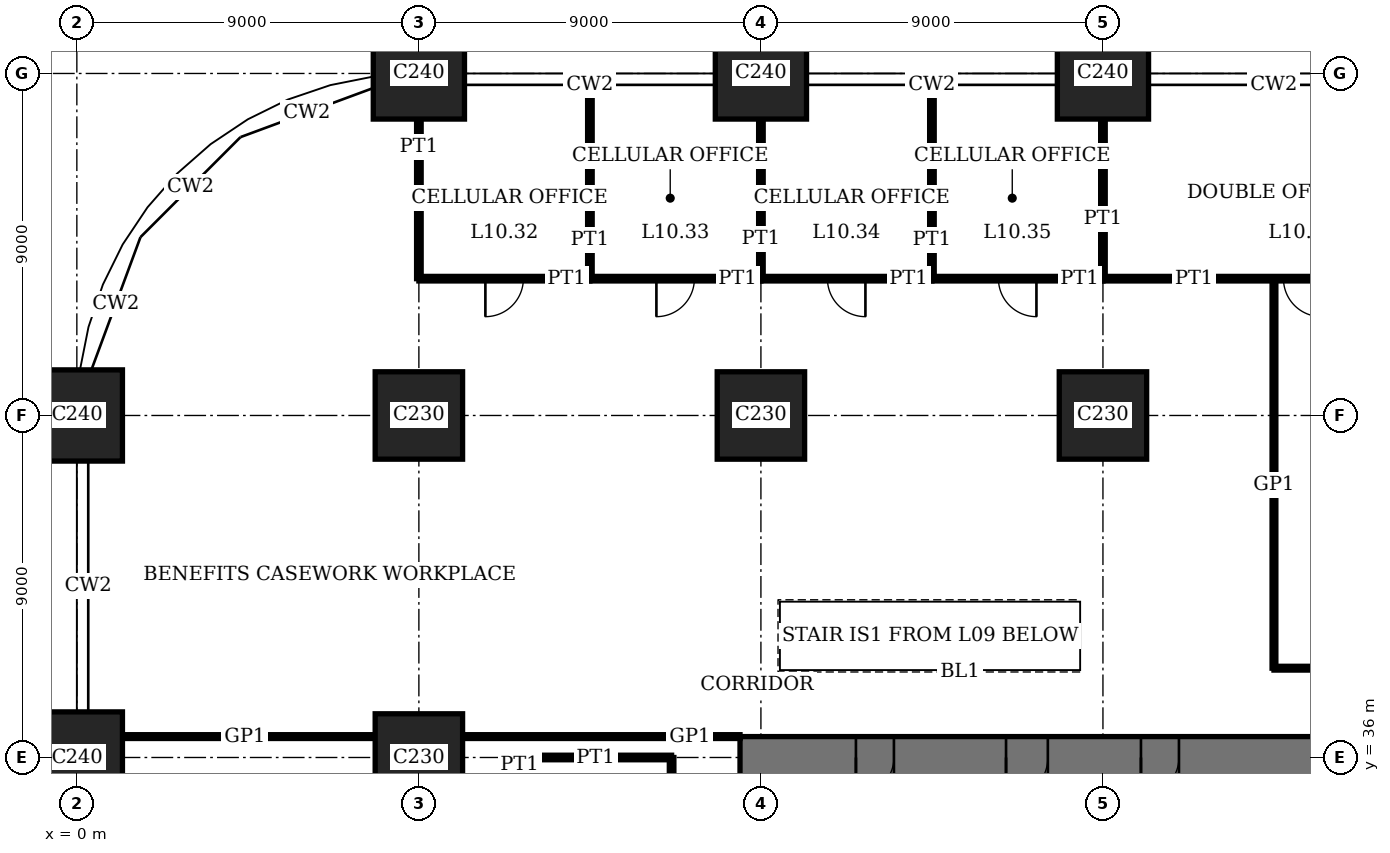
"""IFC4 building model, lengths in metres.
Left out: names, types, materials, properties, quantities, classifications, styles, units other than length and angle.
Written with IfcOpenShell. Run it as: python <this file> out.ifc"""

import sys

from ifc_helpers import new_model, si_unit, direction, frame, frame_2d, origin, origin_2d, place, context, subcontext, project, spatial, rectangle, extrude, element, fill, save


model = new_model("IFC4")
c1 = context("Model", 3, precision=1e-05, world=origin(), true_north=direction((0.0, 1.0)))
c2 = subcontext(c1, "Body", "Model", "MODEL_VIEW")
j1 = project(units=[si_unit("LENGTHUNIT", "METRE"), si_unit("PLANEANGLEUNIT", "RADIAN")], contexts=[c1])
p1 = place(None, origin())
s1 = spatial("IfcSite", under=j1, at=p1, CompositionType="ELEMENT")
p2 = place(p1, origin())
s2 = spatial("IfcBuilding", under=s1, at=p2, CompositionType="ELEMENT")
p3 = place(p2, frame((0.0, 0.0, 43.8)))
s3 = spatial("IfcBuildingStorey", under=s2, at=p3, CompositionType="ELEMENT", Elevation=43.8)
for number, where, z_axis, x_axis in (
    (1, (0.0, 36.0, 0.0), (0.0, 0.0, 1.0), (1.0, 0.0, 0.0)),
    (2, (0.0, 45.0, 0.0), (0.0, 0.0, 1.0), (1.0, 0.0, 0.0)),
):
    element("IfcColumn", number, at=place(p3, frame(where, z_axis=z_axis, x_axis=x_axis)), inside=s3, PredefinedType="COLUMN", context=c2, shape_type="SweptSolid", body=[
        extrude(rectangle(XDim=2.4, YDim=2.4, at=origin_2d()), origin(), (0.0, 0.0, 1.0), 4.0),
    ])
for number, where, z_axis, x_axis in (
    (3, (9.0, 36.0, 0.0), (0.0, 0.0, 1.0), (1.0, 0.0, 0.0)),
    (4, (9.0, 45.0, 0.0), (0.0, 0.0, 1.0), (1.0, 0.0, 0.0)),
):
    element("IfcColumn", number, at=place(p3, frame(where, z_axis=z_axis, x_axis=x_axis)), inside=s3, PredefinedType="COLUMN", context=c2, shape_type="SweptSolid", body=[
        extrude(rectangle(XDim=2.3, YDim=2.3, at=origin_2d()), origin(), (0.0, 0.0, 1.0), 4.0),
    ])
p4 = place(p3, frame((9.0, 54.0, 0.0), z_axis=(0.0, 0.0, 1.0), x_axis=(1.0, 0.0, 0.0)))
e5 = element("IfcColumn", 5, at=p4, inside=s3, PredefinedType="COLUMN", context=c2, shape_type="SweptSolid", body=[
    extrude(rectangle(XDim=2.4, YDim=2.4, at=origin_2d()), origin(), (0.0, 0.0, 1.0), 4.0),
])
p5 = place(p3, frame((18.0, 45.0, 0.0), z_axis=(0.0, 0.0, 1.0), x_axis=(1.0, 0.0, 0.0)))
e6 = element("IfcColumn", 6, at=p5, inside=s3, PredefinedType="COLUMN", context=c2, shape_type="SweptSolid", body=[
    extrude(rectangle(XDim=2.3, YDim=2.3, at=origin_2d()), origin(), (0.0, 0.0, 1.0), 4.0),
])
p6 = place(p3, frame((18.0, 54.0, 0.0), z_axis=(0.0, 0.0, 1.0), x_axis=(1.0, 0.0, 0.0)))
e7 = element("IfcColumn", 7, at=p6, inside=s3, PredefinedType="COLUMN", context=c2, shape_type="SweptSolid", body=[
    extrude(rectangle(XDim=2.4, YDim=2.4, at=origin_2d()), origin(), (0.0, 0.0, 1.0), 4.0),
])
p7 = place(p3, frame((27.0, 45.0, 0.0), z_axis=(0.0, 0.0, 1.0), x_axis=(1.0, 0.0, 0.0)))
e8 = element("IfcColumn", 8, at=p7, inside=s3, PredefinedType="COLUMN", context=c2, shape_type="SweptSolid", body=[
    extrude(rectangle(XDim=2.3, YDim=2.3, at=origin_2d()), origin(), (0.0, 0.0, 1.0), 4.0),
])
p8 = place(p3, frame((27.0, 54.0, 0.0), z_axis=(0.0, 0.0, 1.0), x_axis=(1.0, 0.0, 0.0)))
e9 = element("IfcColumn", 9, at=p8, inside=s3, PredefinedType="COLUMN", context=c2, shape_type="SweptSolid", body=[
    extrude(rectangle(XDim=2.4, YDim=2.4, at=origin_2d()), origin(), (0.0, 0.0, 1.0), 4.0),
])
p9 = place(p3, frame((45.55, 36.0, 0.0), z_axis=(0.0, 0.0, 1.0), x_axis=(-1.0, 0.0, 0.0)))
e10 = element("IfcWall", 10, at=p9, inside=s3, PredefinedType="SHEAR", context=c2, shape_type="SweptSolid", body=[
    extrude(rectangle(XDim=28.1, YDim=1.1, at=frame_2d((14.05, 0.0))), origin(), (0.0, 0.0, 1.0), 4.0),
])
p10 = place(p9, frame((11.55, 0.0, 0.0)))
e11 = element("IfcOpeningElement", 11, at=p10, cuts=e10, PredefinedType="OPENING", context=c2, shape_type="SweptSolid", body=[
    extrude(rectangle(XDim=1.0, YDim=2.4, at=frame_2d((0.5, 1.2))), frame((0.0, 0.56, 0.0), z_axis=(0.0, -1.0, 0.0), x_axis=(1.0, 0.0, 0.0)), (0.0, 0.0, 1.0), 1.12),
])
p11 = place(p9, frame((16.55, 0.0, 0.0)))
e12 = element("IfcOpeningElement", 12, at=p11, cuts=e10, PredefinedType="OPENING", context=c2, shape_type="SweptSolid", body=[
    extrude(rectangle(XDim=1.0, YDim=2.4, at=frame_2d((0.5, 1.2))), frame((0.0, 0.56, 0.0), z_axis=(0.0, -1.0, 0.0), x_axis=(1.0, 0.0, 0.0)), (0.0, 0.0, 1.0), 1.12),
])
p12 = place(p9, frame((20.0, 0.0, 0.0)))
e13 = element("IfcOpeningElement", 13, at=p12, cuts=e10, PredefinedType="OPENING", context=c2, shape_type="SweptSolid", body=[
    extrude(rectangle(XDim=1.1, YDim=2.4, at=frame_2d((0.55, 1.2))), frame((0.0, 0.56, 0.0), z_axis=(0.0, -1.0, 0.0), x_axis=(1.0, 0.0, 0.0)), (0.0, 0.0, 1.0), 1.12),
])
p13 = place(p9, frame((24.05, 0.0, 0.0)))
e14 = element("IfcOpeningElement", 14, at=p13, cuts=e10, PredefinedType="OPENING", context=c2, shape_type="SweptSolid", body=[
    extrude(rectangle(XDim=1.0, YDim=2.4, at=frame_2d((0.5, 1.2))), frame((0.0, 0.56, 0.0), z_axis=(0.0, -1.0, 0.0), x_axis=(1.0, 0.0, 0.0)), (0.0, 0.0, 1.0), 1.12),
])
p14 = place(p3, frame((11.65, 36.0, 0.0), z_axis=(0.0, 0.0, 1.0), x_axis=(1.0, 0.0, 0.0)))
e15 = element("IfcWall", 15, at=p14, inside=s3, PredefinedType="PARTITIONING", context=c2, shape_type="SweptSolid", body=[
    extrude(rectangle(XDim=4.0, YDim=0.12, at=frame_2d((2.0, 0.0))), origin(), (0.0, 0.0, 1.0), 3.05),
])
p15 = place(p3, frame((1.2, 36.55, 0.0), z_axis=(0.0, 0.0, 1.0), x_axis=(1.0, 0.0, 0.0)))
e16 = element("IfcWall", 16, at=p15, inside=s3, PredefinedType="PARTITIONING", context=c2, shape_type="SweptSolid", body=[
    extrude(rectangle(XDim=6.65, YDim=0.1, at=frame_2d((3.325, 0.0))), origin(), (0.0, 0.0, 1.0), 3.75),
])
p16 = place(p3, frame((10.15, 36.55, 0.0), z_axis=(0.0, 0.0, 1.0), x_axis=(1.0, 0.0, 0.0)))
e17 = element("IfcWall", 17, at=p16, inside=s3, PredefinedType="PARTITIONING", context=c2, shape_type="SweptSolid", body=[
    extrude(rectangle(XDim=7.3, YDim=0.1, at=frame_2d((3.65, 0.0))), origin(), (0.0, 0.0, 1.0), 3.75),
])
p17 = place(p3, frame((31.5, 38.35, 0.0), z_axis=(0.0, 0.0, 1.0), x_axis=(1.0, 0.0, 0.0)))
e18 = element("IfcWall", 18, at=p17, inside=s3, PredefinedType="PARTITIONING", context=c2, shape_type="SweptSolid", body=[
    extrude(rectangle(XDim=4.5, YDim=0.1, at=frame_2d((2.25, 0.0))), origin(), (0.0, 0.0, 1.0), 3.75),
])
p18 = place(p17, frame((1.75, 0.0, 0.0)))
e19 = element("IfcOpeningElement", 19, at=p18, cuts=e18, PredefinedType="OPENING", context=c2, shape_type="SweptSolid", body=[
    extrude(rectangle(XDim=1.0, YDim=2.4, at=frame_2d((0.5, 1.2))), frame((0.0, 0.06, 0.0), z_axis=(0.0, -1.0, 0.0), x_axis=(1.0, 0.0, 0.0)), (0.0, 0.0, 1.0), 0.12),
])
p19 = place(p3, frame((9.0, 48.6, 0.0), z_axis=(0.0, 0.0, 1.0), x_axis=(1.0, 0.0, 0.0)))
e20 = element("IfcWall", 20, at=p19, inside=s3, PredefinedType="PARTITIONING", context=c2, shape_type="SweptSolid", body=[
    extrude(rectangle(XDim=4.5, YDim=0.12, at=frame_2d((2.25, 0.0))), origin(), (0.0, 0.0, 1.0), 3.75),
])
p20 = place(p19, frame((1.75, 0.0, 0.0)))
e21 = element("IfcOpeningElement", 21, at=p20, cuts=e20, PredefinedType="OPENING", context=c2, shape_type="SweptSolid", body=[
    extrude(rectangle(XDim=1.0, YDim=2.4, at=frame_2d((0.5, 1.2))), frame((0.0, 0.07, 0.0), z_axis=(0.0, -1.0, 0.0), x_axis=(1.0, 0.0, 0.0)), (0.0, 0.0, 1.0), 0.14),
])
p21 = place(p3, frame((13.5, 48.6, 0.0), z_axis=(0.0, 0.0, 1.0), x_axis=(1.0, 0.0, 0.0)))
e22 = element("IfcWall", 22, at=p21, inside=s3, PredefinedType="PARTITIONING", context=c2, shape_type="SweptSolid", body=[
    extrude(rectangle(XDim=4.5, YDim=0.12, at=frame_2d((2.25, 0.0))), origin(), (0.0, 0.0, 1.0), 3.75),
])
p22 = place(p21, frame((1.75, 0.0, 0.0)))
e23 = element("IfcOpeningElement", 23, at=p22, cuts=e22, PredefinedType="OPENING", context=c2, shape_type="SweptSolid", body=[
    extrude(rectangle(XDim=1.0, YDim=2.4, at=frame_2d((0.5, 1.2))), frame((0.0, 0.07, 0.0), z_axis=(0.0, -1.0, 0.0), x_axis=(1.0, 0.0, 0.0)), (0.0, 0.0, 1.0), 0.14),
])
p23 = place(p3, frame((18.0, 48.6, 0.0), z_axis=(0.0, 0.0, 1.0), x_axis=(1.0, 0.0, 0.0)))
e24 = element("IfcWall", 24, at=p23, inside=s3, PredefinedType="PARTITIONING", context=c2, shape_type="SweptSolid", body=[
    extrude(rectangle(XDim=4.5, YDim=0.12, at=frame_2d((2.25, 0.0))), origin(), (0.0, 0.0, 1.0), 3.75),
])
p24 = place(p23, frame((1.75, 0.0, 0.0)))
e25 = element("IfcOpeningElement", 25, at=p24, cuts=e24, PredefinedType="OPENING", context=c2, shape_type="SweptSolid", body=[
    extrude(rectangle(XDim=1.0, YDim=2.4, at=frame_2d((0.5, 1.2))), frame((0.0, 0.07, 0.0), z_axis=(0.0, -1.0, 0.0), x_axis=(1.0, 0.0, 0.0)), (0.0, 0.0, 1.0), 0.14),
])
p25 = place(p3, frame((22.5, 48.6, 0.0), z_axis=(0.0, 0.0, 1.0), x_axis=(1.0, 0.0, 0.0)))
e26 = element("IfcWall", 26, at=p25, inside=s3, PredefinedType="PARTITIONING", context=c2, shape_type="SweptSolid", body=[
    extrude(rectangle(XDim=4.5, YDim=0.12, at=frame_2d((2.25, 0.0))), origin(), (0.0, 0.0, 1.0), 3.75),
])
p26 = place(p25, frame((1.75, 0.0, 0.0)))
e27 = element("IfcOpeningElement", 27, at=p26, cuts=e26, PredefinedType="OPENING", context=c2, shape_type="SweptSolid", body=[
    extrude(rectangle(XDim=1.0, YDim=2.4, at=frame_2d((0.5, 1.2))), frame((0.0, 0.07, 0.0), z_axis=(0.0, -1.0, 0.0), x_axis=(1.0, 0.0, 0.0)), (0.0, 0.0, 1.0), 0.14),
])
p27 = place(p3, frame((27.0, 48.6, 0.0), z_axis=(0.0, 0.0, 1.0), x_axis=(1.0, 0.0, 0.0)))
e28 = element("IfcWall", 28, at=p27, inside=s3, PredefinedType="PARTITIONING", context=c2, shape_type="SweptSolid", body=[
    extrude(rectangle(XDim=9.0, YDim=0.12, at=frame_2d((4.5, 0.0))), origin(), (0.0, 0.0, 1.0), 3.75),
])
p28 = place(p27, frame((4.75, 0.0, 0.0)))
e29 = element("IfcOpeningElement", 29, at=p28, cuts=e28, PredefinedType="OPENING", context=c2, shape_type="SweptSolid", body=[
    extrude(rectangle(XDim=1.0, YDim=2.4, at=frame_2d((0.5, 1.2))), frame((0.0, 0.07, 0.0), z_axis=(0.0, -1.0, 0.0), x_axis=(1.0, 0.0, 0.0)), (0.0, 0.0, 1.0), 0.14),
])
p29 = place(p3, frame((9.0, 48.6, 0.0), z_axis=(0.0, 0.0, 1.0), x_axis=(0.0, 1.0, 0.0)))
e30 = element("IfcWall", 30, at=p29, inside=s3, PredefinedType="PARTITIONING", context=c2, shape_type="SweptSolid", body=[
    extrude(rectangle(XDim=4.2, YDim=0.12, at=frame_2d((2.1, 0.0))), origin(), (0.0, 0.0, 1.0), 3.05),
])
p30 = place(p3, frame((11.65, 31.5, 0.0), z_axis=(0.0, 0.0, 1.0), x_axis=(0.0, 1.0, 0.0)))
e31 = element("IfcWall", 31, at=p30, inside=s3, PredefinedType="PARTITIONING", context=c2, shape_type="SweptSolid", body=[
    extrude(rectangle(XDim=4.5, YDim=0.12, at=frame_2d((2.25, 0.0))), origin(), (0.0, 0.0, 1.0), 3.75),
])
p31 = place(p30, frame((1.75, 0.0, 0.0)))
e32 = element("IfcOpeningElement", 32, at=p31, cuts=e31, PredefinedType="OPENING", context=c2, shape_type="SweptSolid", body=[
    extrude(rectangle(XDim=1.0, YDim=2.4, at=frame_2d((0.5, 1.2))), frame((0.0, 0.07, 0.0), z_axis=(0.0, -1.0, 0.0), x_axis=(1.0, 0.0, 0.0)), (0.0, 0.0, 1.0), 0.14),
])
p32 = place(p3, frame((13.5, 48.6, 0.0), z_axis=(0.0, 0.0, 1.0), x_axis=(0.0, 1.0, 0.0)))
e33 = element("IfcWall", 33, at=p32, inside=s3, PredefinedType="PARTITIONING", context=c2, shape_type="SweptSolid", body=[
    extrude(rectangle(XDim=5.09, YDim=0.12, at=frame_2d((2.545, 0.0))), origin(), (0.0, 0.0, 1.0), 3.75),
])
p33 = place(p3, frame((15.65, 31.5, 0.0), z_axis=(0.0, 0.0, 1.0), x_axis=(0.0, 1.0, 0.0)))
e34 = element("IfcWall", 34, at=p33, inside=s3, PredefinedType="PARTITIONING", context=c2, shape_type="SweptSolid", body=[
    extrude(rectangle(XDim=4.5, YDim=0.12, at=frame_2d((2.25, 0.0))), origin(), (0.0, 0.0, 1.0), 3.75),
])
p34 = place(p3, frame((18.0, 48.6, 0.0), z_axis=(0.0, 0.0, 1.0), x_axis=(0.0, 1.0, 0.0)))
e35 = element("IfcWall", 35, at=p34, inside=s3, PredefinedType="PARTITIONING", context=c2, shape_type="SweptSolid", body=[
    extrude(rectangle(XDim=4.2, YDim=0.12, at=frame_2d((2.1, 0.0))), origin(), (0.0, 0.0, 1.0), 3.05),
])
p35 = place(p3, frame((22.5, 48.6, 0.0), z_axis=(0.0, 0.0, 1.0), x_axis=(0.0, 1.0, 0.0)))
e36 = element("IfcWall", 36, at=p35, inside=s3, PredefinedType="PARTITIONING", context=c2, shape_type="SweptSolid", body=[
    extrude(rectangle(XDim=5.09, YDim=0.12, at=frame_2d((2.545, 0.0))), origin(), (0.0, 0.0, 1.0), 3.75),
])
p36 = place(p3, frame((27.0, 48.6, 0.0), z_axis=(0.0, 0.0, 1.0), x_axis=(0.0, 1.0, 0.0)))
e37 = element("IfcWall", 37, at=p36, inside=s3, PredefinedType="PARTITIONING", context=c2, shape_type="SweptSolid", body=[
    extrude(rectangle(XDim=4.2, YDim=0.12, at=frame_2d((2.1, 0.0))), origin(), (0.0, 0.0, 1.0), 3.05),
])
p37 = place(p3, frame((31.5, 38.35, 0.0), z_axis=(0.0, 0.0, 1.0), x_axis=(0.0, 1.0, 0.0)))
e38 = element("IfcWall", 38, at=p37, inside=s3, PredefinedType="PARTITIONING", context=c2, shape_type="SweptSolid", body=[
    extrude(rectangle(XDim=10.26, YDim=0.1, at=frame_2d((5.13, 0.0))), origin(), (0.0, 0.0, 1.0), 3.75),
])
p38 = place(p11, origin())
e39 = element("IfcDoor", 39, at=p38, inside=s3, OperationType="SINGLE_SWING_LEFT", PredefinedType="DOOR", context=c2, shape_type="SweptSolid", body=[
    extrude(rectangle(XDim=1.0, YDim=2.4, at=frame_2d((0.5, 1.2))), frame((0.0, 0.025, 0.0), z_axis=(0.0, -1.0, 0.0), x_axis=(1.0, 0.0, 0.0)), (0.0, 0.0, 1.0), 0.05),
    extrude(rectangle(XDim=0.04, YDim=2.4, at=frame_2d((0.02, 1.2))), frame((0.0, 0.4, 0.0), z_axis=(0.0, -1.0, 0.0), x_axis=(1.0, 0.0, 0.0)), (0.0, 0.0, 1.0), 0.8),
    extrude(rectangle(XDim=0.04, YDim=2.4, at=frame_2d((0.98, 1.2))), frame((0.0, 0.4, 0.0), z_axis=(0.0, -1.0, 0.0), x_axis=(1.0, 0.0, 0.0)), (0.0, 0.0, 1.0), 0.8),
    extrude(rectangle(XDim=1.0, YDim=0.04, at=frame_2d((0.5, 2.38))), frame((0.0, 0.4, 0.0), z_axis=(0.0, -1.0, 0.0), x_axis=(1.0, 0.0, 0.0)), (0.0, 0.0, 1.0), 0.8),
])
fill(e12, e39)
p39 = place(p12, origin())
e40 = element("IfcDoor", 40, at=p39, inside=s3, OperationType="SINGLE_SWING_LEFT", PredefinedType="DOOR", context=c2, shape_type="SweptSolid", body=[
    extrude(rectangle(XDim=1.1, YDim=2.4, at=frame_2d((0.55, 1.2))), frame((0.0, 0.025, 0.0), z_axis=(0.0, -1.0, 0.0), x_axis=(1.0, 0.0, 0.0)), (0.0, 0.0, 1.0), 0.05),
    extrude(rectangle(XDim=0.04, YDim=2.4, at=frame_2d((0.02, 1.2))), frame((0.0, 0.44, 0.0), z_axis=(0.0, -1.0, 0.0), x_axis=(1.0, 0.0, 0.0)), (0.0, 0.0, 1.0), 0.88),
    extrude(rectangle(XDim=0.04, YDim=2.4, at=frame_2d((1.08, 1.2))), frame((0.0, 0.44, 0.0), z_axis=(0.0, -1.0, 0.0), x_axis=(1.0, 0.0, 0.0)), (0.0, 0.0, 1.0), 0.88),
    extrude(rectangle(XDim=1.1, YDim=0.04, at=frame_2d((0.55, 2.38))), frame((0.0, 0.44, 0.0), z_axis=(0.0, -1.0, 0.0), x_axis=(1.0, 0.0, 0.0)), (0.0, 0.0, 1.0), 0.88),
])
fill(e13, e40)
p40 = place(p13, origin())
e41 = element("IfcDoor", 41, at=p40, inside=s3, OperationType="SINGLE_SWING_LEFT", PredefinedType="DOOR", context=c2, shape_type="SweptSolid", body=[
    extrude(rectangle(XDim=1.0, YDim=2.4, at=frame_2d((0.5, 1.2))), frame((0.0, 0.025, 0.0), z_axis=(0.0, -1.0, 0.0), x_axis=(1.0, 0.0, 0.0)), (0.0, 0.0, 1.0), 0.05),
    extrude(rectangle(XDim=0.04, YDim=2.4, at=frame_2d((0.02, 1.2))), frame((0.0, 0.4, 0.0), z_axis=(0.0, -1.0, 0.0), x_axis=(1.0, 0.0, 0.0)), (0.0, 0.0, 1.0), 0.8),
    extrude(rectangle(XDim=0.04, YDim=2.4, at=frame_2d((0.98, 1.2))), frame((0.0, 0.4, 0.0), z_axis=(0.0, -1.0, 0.0), x_axis=(1.0, 0.0, 0.0)), (0.0, 0.0, 1.0), 0.8),
    extrude(rectangle(XDim=1.0, YDim=0.04, at=frame_2d((0.5, 2.38))), frame((0.0, 0.4, 0.0), z_axis=(0.0, -1.0, 0.0), x_axis=(1.0, 0.0, 0.0)), (0.0, 0.0, 1.0), 0.8),
])
fill(e14, e41)
p41 = place(p20, origin())
e42 = element("IfcDoor", 42, at=p41, inside=s3, OperationType="SINGLE_SWING_LEFT", PredefinedType="DOOR", context=c2, shape_type="SweptSolid", body=[
    extrude(rectangle(XDim=1.0, YDim=2.4, at=frame_2d((0.5, 1.2))), frame((0.0, 0.025, 0.0), z_axis=(0.0, -1.0, 0.0), x_axis=(1.0, 0.0, 0.0)), (0.0, 0.0, 1.0), 0.05),
])
fill(e21, e42)
p42 = place(p22, origin())
e43 = element("IfcDoor", 43, at=p42, inside=s3, OperationType="SINGLE_SWING_LEFT", PredefinedType="DOOR", context=c2, shape_type="SweptSolid", body=[
    extrude(rectangle(XDim=1.0, YDim=2.4, at=frame_2d((0.5, 1.2))), frame((0.0, 0.025, 0.0), z_axis=(0.0, -1.0, 0.0), x_axis=(1.0, 0.0, 0.0)), (0.0, 0.0, 1.0), 0.05),
])
fill(e23, e43)
p43 = place(p24, origin())
e44 = element("IfcDoor", 44, at=p43, inside=s3, OperationType="SINGLE_SWING_RIGHT", PredefinedType="DOOR", context=c2, shape_type="SweptSolid", body=[
    extrude(rectangle(XDim=1.0, YDim=2.4, at=frame_2d((0.5, 1.2))), frame((0.0, 0.025, 0.0), z_axis=(0.0, -1.0, 0.0), x_axis=(1.0, 0.0, 0.0)), (0.0, 0.0, 1.0), 0.05),
])
fill(e25, e44)
p44 = place(p26, origin())
e45 = element("IfcDoor", 45, at=p44, inside=s3, OperationType="SINGLE_SWING_RIGHT", PredefinedType="DOOR", context=c2, shape_type="SweptSolid", body=[
    extrude(rectangle(XDim=1.0, YDim=2.4, at=frame_2d((0.5, 1.2))), frame((0.0, 0.025, 0.0), z_axis=(0.0, -1.0, 0.0), x_axis=(1.0, 0.0, 0.0)), (0.0, 0.0, 1.0), 0.05),
])
fill(e27, e45)
p45 = place(p28, origin())
e46 = element("IfcDoor", 46, at=p45, inside=s3, OperationType="SINGLE_SWING_RIGHT", PredefinedType="DOOR", context=c2, shape_type="SweptSolid", body=[
    extrude(rectangle(XDim=1.0, YDim=2.4, at=frame_2d((0.5, 1.2))), frame((0.0, 0.025, 0.0), z_axis=(0.0, -1.0, 0.0), x_axis=(1.0, 0.0, 0.0)), (0.0, 0.0, 1.0), 0.05),
])
fill(e29, e46)
save(model, sys.argv[1])
